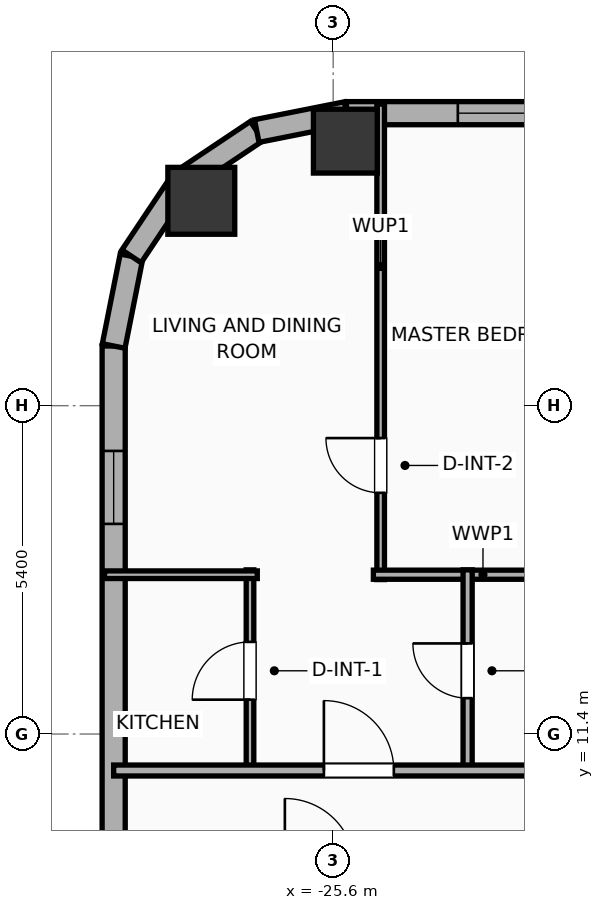
"""IFC4 building model, lengths in metres.
Left out: names, types, materials, properties, quantities, classifications, styles, units other than length and angle.
Written with IfcOpenShell. Run it as: python <this file> out.ifc"""

import sys

from ifc_helpers import new_model, si_unit, direction, frame, frame_2d, origin, origin_2d, place, context, subcontext, project, spatial, rectangle, hollow_rectangle, hollow_circle, extrude, element, fill, save


model = new_model("IFC4")
c1 = context("Model", 3, precision=1e-05, world=origin(), true_north=direction((0.0, 1.0)))
c2 = subcontext(c1, "Body", "Model", "MODEL_VIEW")
j1 = project(units=[si_unit("LENGTHUNIT", "METRE"), si_unit("PLANEANGLEUNIT", "RADIAN")], contexts=[c1])
p1 = place(None, origin())
s1 = spatial("IfcSite", under=j1, at=p1, CompositionType="ELEMENT")
p2 = place(p1, origin())
s2 = spatial("IfcBuilding", under=s1, at=p2, CompositionType="ELEMENT")
p3 = place(p2, frame((0.0, 0.0, 109.2)))
s3 = spatial("IfcBuildingStorey", under=s2, at=p3, CompositionType="ELEMENT", Elevation=109.2)
p4 = place(p3, frame((-25.4, 21.15, 0.0), z_axis=(0.0, 0.0, 1.0), x_axis=(1.0, 0.0, 0.0)))
e1 = element("IfcColumn", 1, at=p4, inside=s3, PredefinedType="COLUMN", context=c2, shape_type="SweptSolid", body=[
    extrude(hollow_rectangle(XDim=1.05, YDim=1.05, WallThickness=0.036, at=origin_2d()), origin(), (0.0, 0.0, 1.0), 3.9),
])
p5 = place(p3, frame((-27.769, 20.169, 0.0), z_axis=(0.0, 0.0, 1.0), x_axis=(1.0, 0.0, 0.0)))
e2 = element("IfcColumn", 2, at=p5, inside=s3, PredefinedType="COLUMN", context=c2, shape_type="SweptSolid", body=[
    extrude(hollow_circle(Radius=0.55, WallThickness=0.036, at=origin_2d()), origin(), (0.0, 0.0, 1.0), 3.9),
])
p6 = place(p3, frame((-29.21, -16.581, 0.0), z_axis=(0.0, 0.0, 1.0), x_axis=(0.0, 1.0, 0.0)))
e3 = element("IfcWall", 3, at=p6, inside=s3, PredefinedType="ELEMENTEDWALL", context=c2, shape_type="SweptSolid", body=[
    extrude(rectangle(XDim=34.363, YDim=0.38, at=frame_2d((17.181, 0.0))), origin(), (0.0, 0.0, 1.0), 3.65),
])
p7 = place(p6, frame((31.437, 0.0, 0.75)))
e4 = element("IfcOpeningElement", 4, at=p7, cuts=e3, PredefinedType="OPENING", context=c2, shape_type="SweptSolid", body=[
    extrude(rectangle(XDim=1.2, YDim=2.05, at=frame_2d((0.6, 1.025))), frame((0.0, 0.2, 0.0), z_axis=(0.0, -1.0, 0.0), x_axis=(1.0, 0.0, 0.0)), (0.0, 0.0, 1.0), 0.4),
])
p8 = place(p6, frame((20.676, 0.0, 0.75)))
e5 = element("IfcOpeningElement", 5, at=p8, cuts=e3, PredefinedType="OPENING", context=c2, shape_type="SweptSolid", body=[
    extrude(rectangle(XDim=1.2, YDim=2.05, at=frame_2d((0.6, 1.025))), frame((0.0, 0.2, 0.0), z_axis=(0.0, -1.0, 0.0), x_axis=(1.0, 0.0, 0.0)), (0.0, 0.0, 1.0), 0.4),
])
p9 = place(p6, frame((11.426, 0.0, 0.75)))
e6 = element("IfcOpeningElement", 6, at=p9, cuts=e3, PredefinedType="OPENING", context=c2, shape_type="SweptSolid", body=[
    extrude(rectangle(XDim=1.2, YDim=2.05, at=frame_2d((0.6, 1.025))), frame((0.0, 0.2, 0.0), z_axis=(0.0, -1.0, 0.0), x_axis=(1.0, 0.0, 0.0)), (0.0, 0.0, 1.0), 0.4),
])
p10 = place(p3, frame((-29.21, 17.781, 0.0), z_axis=(0.0, 0.0, 1.0), x_axis=(0.195086038585, 0.980786132421, 0.0)))
e7 = element("IfcWall", 7, at=p10, inside=s3, PredefinedType="ELEMENTEDWALL", context=c2, shape_type="SweptSolid", body=[
    extrude(rectangle(XDim=1.504, YDim=0.38, at=frame_2d((0.752, 0.0))), origin(), (0.0, 0.0, 1.0), 3.65),
])
p11 = place(p3, frame((-28.917, 19.257, 0.0), z_axis=(0.0, 0.0, 1.0), x_axis=(0.555610286119, 0.831442848281, 0.0)))
e8 = element("IfcWall", 8, at=p11, inside=s3, PredefinedType="ELEMENTEDWALL", context=c2, shape_type="SweptSolid", body=[
    extrude(rectangle(XDim=1.485, YDim=0.38, at=frame_2d((0.743, 0.0))), origin(), (0.0, 0.0, 1.0), 3.65),
])
p12 = place(p3, frame((-28.091, 20.491, 0.0), z_axis=(0.0, 0.0, 1.0), x_axis=(0.831468045563, 0.555572577804, 0.0)))
e9 = element("IfcWall", 9, at=p12, inside=s3, PredefinedType="ELEMENTEDWALL", context=c2, shape_type="SweptSolid", body=[
    extrude(rectangle(XDim=1.485, YDim=0.38, at=frame_2d((0.742, 0.0))), origin(), (0.0, 0.0, 1.0), 3.65),
])
p13 = place(p3, frame((-26.857, 21.316, 0.0), z_axis=(0.0, 0.0, 1.0), x_axis=(0.980755066645, 0.195242155415, 0.0)))
e10 = element("IfcWall", 10, at=p13, inside=s3, PredefinedType="ELEMENTEDWALL", context=c2, shape_type="SweptSolid", body=[
    extrude(rectangle(XDim=1.504, YDim=0.38, at=frame_2d((0.752, 0.0))), origin(), (0.0, 0.0, 1.0), 3.65),
])
p14 = place(p3, frame((-25.381, 21.61, 0.0), z_axis=(0.0, 0.0, 1.0), x_axis=(1.0, 0.0, 0.0)))
e11 = element("IfcWall", 11, at=p14, inside=s3, PredefinedType="ELEMENTEDWALL", context=c2, shape_type="SweptSolid", body=[
    extrude(rectangle(XDim=54.763, YDim=0.38, at=frame_2d((27.381, 0.0))), origin(), (0.0, 0.0, 1.0), 3.65),
])
p15 = place(p14, frame((5.645, 0.0, 0.75)))
e12 = element("IfcOpeningElement", 12, at=p15, cuts=e11, PredefinedType="OPENING", context=c2, shape_type="SweptSolid", body=[
    extrude(rectangle(XDim=2.4, YDim=2.1, at=frame_2d((1.2, 1.05))), frame((0.0, 0.2, 0.0), z_axis=(0.0, -1.0, 0.0), x_axis=(1.0, 0.0, 0.0)), (0.0, 0.0, 1.0), 0.4),
])
p16 = place(p14, frame((45.067, 0.0, 0.75)))
e13 = element("IfcOpeningElement", 13, at=p16, cuts=e11, PredefinedType="OPENING", context=c2, shape_type="SweptSolid", body=[
    extrude(rectangle(XDim=2.4, YDim=2.1, at=frame_2d((1.2, 1.05))), frame((0.0, 0.2, 0.0), z_axis=(0.0, -1.0, 0.0), x_axis=(1.0, 0.0, 0.0)), (0.0, 0.0, 1.0), 0.4),
])
p17 = place(p14, frame((1.831, 0.0, 0.75)))
e14 = element("IfcOpeningElement", 14, at=p17, cuts=e11, PredefinedType="OPENING", context=c2, shape_type="SweptSolid", body=[
    extrude(rectangle(XDim=1.2, YDim=2.05, at=frame_2d((0.6, 1.025))), frame((0.0, 0.2, 0.0), z_axis=(0.0, -1.0, 0.0), x_axis=(1.0, 0.0, 0.0)), (0.0, 0.0, 1.0), 0.4),
])
p18 = place(p14, frame((8.996, 0.0, 0.75)))
e15 = element("IfcOpeningElement", 15, at=p18, cuts=e11, PredefinedType="OPENING", context=c2, shape_type="SweptSolid", body=[
    extrude(rectangle(XDim=1.2, YDim=2.05, at=frame_2d((0.6, 1.025))), frame((0.0, 0.2, 0.0), z_axis=(0.0, -1.0, 0.0), x_axis=(1.0, 0.0, 0.0)), (0.0, 0.0, 1.0), 0.4),
])
p19 = place(p14, frame((15.102, 0.0, 0.75)))
e16 = element("IfcOpeningElement", 16, at=p19, cuts=e11, PredefinedType="OPENING", context=c2, shape_type="SweptSolid", body=[
    extrude(rectangle(XDim=1.2, YDim=2.05, at=frame_2d((0.6, 1.025))), frame((0.0, 0.2, 0.0), z_axis=(0.0, -1.0, 0.0), x_axis=(1.0, 0.0, 0.0)), (0.0, 0.0, 1.0), 0.4),
])
p20 = place(p14, frame((12.352, 0.0, 0.75)))
e17 = element("IfcOpeningElement", 17, at=p20, cuts=e11, PredefinedType="OPENING", context=c2, shape_type="SweptSolid", body=[
    extrude(rectangle(XDim=1.2, YDim=2.05, at=frame_2d((0.6, 1.025))), frame((0.0, 0.2, 0.0), z_axis=(0.0, -1.0, 0.0), x_axis=(1.0, 0.0, 0.0)), (0.0, 0.0, 1.0), 0.4),
])
p21 = place(p14, frame((19.936, 0.0, 0.75)))
e18 = element("IfcOpeningElement", 18, at=p21, cuts=e11, PredefinedType="OPENING", context=c2, shape_type="SweptSolid", body=[
    extrude(rectangle(XDim=1.2, YDim=2.05, at=frame_2d((0.6, 1.025))), frame((0.0, 0.2, 0.0), z_axis=(0.0, -1.0, 0.0), x_axis=(1.0, 0.0, 0.0)), (0.0, 0.0, 1.0), 0.4),
])
p22 = place(p14, frame((17.786, 0.0, 0.75)))
e19 = element("IfcOpeningElement", 19, at=p22, cuts=e11, PredefinedType="OPENING", context=c2, shape_type="SweptSolid", body=[
    extrude(rectangle(XDim=1.2, YDim=2.05, at=frame_2d((0.6, 1.025))), frame((0.0, 0.2, 0.0), z_axis=(0.0, -1.0, 0.0), x_axis=(1.0, 0.0, 0.0)), (0.0, 0.0, 1.0), 0.4),
])
p23 = place(p14, frame((23.826, 0.0, 0.75)))
e20 = element("IfcOpeningElement", 20, at=p23, cuts=e11, PredefinedType="OPENING", context=c2, shape_type="SweptSolid", body=[
    extrude(rectangle(XDim=1.2, YDim=2.05, at=frame_2d((0.6, 1.025))), frame((0.0, 0.2, 0.0), z_axis=(0.0, -1.0, 0.0), x_axis=(1.0, 0.0, 0.0)), (0.0, 0.0, 1.0), 0.4),
])
p24 = place(p14, frame((26.576, 0.0, 0.75)))
e21 = element("IfcOpeningElement", 21, at=p24, cuts=e11, PredefinedType="OPENING", context=c2, shape_type="SweptSolid", body=[
    extrude(rectangle(XDim=1.2, YDim=2.05, at=frame_2d((0.6, 1.025))), frame((0.0, 0.2, 0.0), z_axis=(0.0, -1.0, 0.0), x_axis=(1.0, 0.0, 0.0)), (0.0, 0.0, 1.0), 0.4),
])
p25 = place(p14, frame((30.431, 0.0, 0.75)))
e22 = element("IfcOpeningElement", 22, at=p25, cuts=e11, PredefinedType="OPENING", context=c2, shape_type="SweptSolid", body=[
    extrude(rectangle(XDim=1.2, YDim=2.05, at=frame_2d((0.6, 1.025))), frame((0.0, 0.2, 0.0), z_axis=(0.0, -1.0, 0.0), x_axis=(1.0, 0.0, 0.0)), (0.0, 0.0, 1.0), 0.4),
])
p26 = place(p14, frame((38.581, 0.0, 0.75)))
e23 = element("IfcOpeningElement", 23, at=p26, cuts=e11, PredefinedType="OPENING", context=c2, shape_type="SweptSolid", body=[
    extrude(rectangle(XDim=1.2, YDim=2.05, at=frame_2d((0.6, 1.025))), frame((0.0, 0.2, 0.0), z_axis=(0.0, -1.0, 0.0), x_axis=(1.0, 0.0, 0.0)), (0.0, 0.0, 1.0), 0.4),
])
p27 = place(p14, frame((34.786, 0.0, 0.75)))
e24 = element("IfcOpeningElement", 24, at=p27, cuts=e11, PredefinedType="OPENING", context=c2, shape_type="SweptSolid", body=[
    extrude(rectangle(XDim=1.2, YDim=2.05, at=frame_2d((0.6, 1.025))), frame((0.0, 0.2, 0.0), z_axis=(0.0, -1.0, 0.0), x_axis=(1.0, 0.0, 0.0)), (0.0, 0.0, 1.0), 0.4),
])
p28 = place(p14, frame((41.876, 0.0, 0.75)))
e25 = element("IfcOpeningElement", 25, at=p28, cuts=e11, PredefinedType="OPENING", context=c2, shape_type="SweptSolid", body=[
    extrude(rectangle(XDim=1.2, YDim=2.05, at=frame_2d((0.6, 1.025))), frame((0.0, 0.2, 0.0), z_axis=(0.0, -1.0, 0.0), x_axis=(1.0, 0.0, 0.0)), (0.0, 0.0, 1.0), 0.4),
])
p29 = place(p14, frame((49.385, 0.0, 0.75)))
e26 = element("IfcOpeningElement", 26, at=p29, cuts=e11, PredefinedType="OPENING", context=c2, shape_type="SweptSolid", body=[
    extrude(rectangle(XDim=1.2, YDim=2.05, at=frame_2d((0.6, 1.025))), frame((0.0, 0.2, 0.0), z_axis=(0.0, -1.0, 0.0), x_axis=(1.0, 0.0, 0.0)), (0.0, 0.0, 1.0), 0.4),
])
p30 = place(p14, frame((52.181, 0.0, 0.75)))
e27 = element("IfcOpeningElement", 27, at=p30, cuts=e11, PredefinedType="OPENING", context=c2, shape_type="SweptSolid", body=[
    extrude(rectangle(XDim=1.2, YDim=2.05, at=frame_2d((0.6, 1.025))), frame((0.0, 0.2, 0.0), z_axis=(0.0, -1.0, 0.0), x_axis=(1.0, 0.0, 0.0)), (0.0, 0.0, 1.0), 0.4),
])
p31 = place(p3, frame((-24.819, 13.94, 0.0), z_axis=(0.0, 0.0, 1.0), x_axis=(0.0, 1.0, 0.0)))
e28 = element("IfcWall", 28, at=p31, inside=s3, PredefinedType="PARTITIONING", context=c2, shape_type="SweptSolid", body=[
    extrude(rectangle(XDim=7.82, YDim=0.125, at=frame_2d((3.91, 0.0))), origin(), (0.0, 0.0, 1.0), 3.65),
])
p32 = place(p31, frame((1.427, 0.0, 0.0)))
e29 = element("IfcOpeningElement", 29, at=p32, cuts=e28, PredefinedType="OPENING", context=c2, shape_type="SweptSolid", body=[
    extrude(rectangle(XDim=0.9, YDim=2.05, at=frame_2d((0.45, 1.025))), frame((0.0, 0.073, 0.0), z_axis=(0.0, -1.0, 0.0), x_axis=(1.0, 0.0, 0.0)), (0.0, 0.0, 1.0), 0.145),
])
p33 = place(p3, frame((-24.939, 14.02, 0.0), z_axis=(0.0, 0.0, 1.0), x_axis=(1.0, 0.0, 0.0)))
e30 = element("IfcWall", 30, at=p33, inside=s3, PredefinedType="PLUMBINGWALL", context=c2, shape_type="SweptSolid", body=[
    extrude(rectangle(XDim=3.605, YDim=0.15, at=frame_2d((1.802, 0.0))), origin(), (0.0, 0.0, 1.0), 3.65),
])
p34 = place(p3, frame((-26.968, 10.78, 0.0), z_axis=(0.0, 0.0, 1.0), x_axis=(0.0, 1.0, 0.0)))
e31 = element("IfcWall", 31, at=p34, inside=s3, PredefinedType="PARTITIONING", context=c2, shape_type="SweptSolid", body=[
    extrude(rectangle(XDim=3.32, YDim=0.125, at=frame_2d((1.66, 0.0))), origin(), (0.0, 0.0, 1.0), 3.65),
])
p35 = place(p34, frame((1.185, 0.0, 0.0)))
e32 = element("IfcOpeningElement", 32, at=p35, cuts=e31, PredefinedType="OPENING", context=c2, shape_type="SweptSolid", body=[
    extrude(rectangle(XDim=0.95, YDim=2.05, at=frame_2d((0.475, 1.025))), frame((0.0, 0.073, 0.0), z_axis=(0.0, -1.0, 0.0), x_axis=(1.0, 0.0, 0.0)), (0.0, 0.0, 1.0), 0.145),
])
p36 = place(p3, frame((-29.36, 14.02, 0.0), z_axis=(0.0, 0.0, 1.0), x_axis=(1.0, 0.0, 0.0)))
e33 = element("IfcWall", 33, at=p36, inside=s3, PredefinedType="PARTITIONING", context=c2, shape_type="SweptSolid", body=[
    extrude(rectangle(XDim=2.512, YDim=0.125, at=frame_2d((1.256, 0.0))), origin(), (0.0, 0.0, 1.0), 3.65),
])
p37 = place(p3, frame((-23.389, 10.78, 0.0), z_axis=(0.0, 0.0, 1.0), x_axis=(0.0, 1.0, 0.0)))
e34 = element("IfcWall", 34, at=p37, inside=s3, PredefinedType="PLUMBINGWALL", context=c2, shape_type="SweptSolid", body=[
    extrude(rectangle(XDim=3.32, YDim=0.15, at=frame_2d((1.66, 0.0))), origin(), (0.0, 0.0, 1.0), 3.65),
])
p38 = place(p37, frame((1.21, 0.0, 0.0)))
e35 = element("IfcOpeningElement", 35, at=p38, cuts=e34, PredefinedType="OPENING", context=c2, shape_type="SweptSolid", body=[
    extrude(rectangle(XDim=0.9, YDim=2.05, at=frame_2d((0.45, 1.025))), frame((0.0, 0.085, 0.0), z_axis=(0.0, -1.0, 0.0), x_axis=(1.0, 0.0, 0.0)), (0.0, 0.0, 1.0), 0.17),
])
p39 = place(p3, frame((-29.21, 10.8, 0.0), z_axis=(0.0, 0.0, 1.0), x_axis=(1.0, 0.0, 0.0)))
e36 = element("IfcWall", 36, at=p39, inside=s3, PredefinedType="PARTITIONING", context=c2, shape_type="SweptSolid", body=[
    extrude(rectangle(XDim=62.42, YDim=0.18, at=frame_2d((31.21, 0.0))), origin(), (0.0, 0.0, 1.0), 3.65),
])
p40 = place(p39, frame((3.457, 0.0, 0.0)))
e37 = element("IfcOpeningElement", 37, at=p40, cuts=e36, PredefinedType="OPENING", context=c2, shape_type="SweptSolid", body=[
    extrude(rectangle(XDim=1.15, YDim=2.05, at=frame_2d((0.575, 1.025))), frame((0.0, 0.1, 0.0), z_axis=(0.0, -1.0, 0.0), x_axis=(1.0, 0.0, 0.0)), (0.0, 0.0, 1.0), 0.2),
])
p41 = place(p39, frame((11.297, 0.0, 0.0)))
e38 = element("IfcOpeningElement", 38, at=p41, cuts=e36, PredefinedType="OPENING", context=c2, shape_type="SweptSolid", body=[
    extrude(rectangle(XDim=1.15, YDim=2.05, at=frame_2d((0.575, 1.025))), frame((0.0, 0.1, 0.0), z_axis=(0.0, -1.0, 0.0), x_axis=(1.0, 0.0, 0.0)), (0.0, 0.0, 1.0), 0.2),
])
p42 = place(p39, frame((18.925, 0.0, 0.0)))
e39 = element("IfcOpeningElement", 39, at=p42, cuts=e36, PredefinedType="OPENING", context=c2, shape_type="SweptSolid", body=[
    extrude(rectangle(XDim=1.15, YDim=2.05, at=frame_2d((0.575, 1.025))), frame((0.0, 0.1, 0.0), z_axis=(0.0, -1.0, 0.0), x_axis=(1.0, 0.0, 0.0)), (0.0, 0.0, 1.0), 0.2),
])
p43 = place(p39, frame((24.362, 0.0, 0.0)))
e40 = element("IfcOpeningElement", 40, at=p43, cuts=e36, PredefinedType="OPENING", context=c2, shape_type="SweptSolid", body=[
    extrude(rectangle(XDim=1.15, YDim=2.05, at=frame_2d((0.575, 1.025))), frame((0.0, 0.1, 0.0), z_axis=(0.0, -1.0, 0.0), x_axis=(1.0, 0.0, 0.0)), (0.0, 0.0, 1.0), 0.2),
])
p44 = place(p39, frame((27.708, 0.0, 0.0)))
e41 = element("IfcOpeningElement", 41, at=p44, cuts=e36, PredefinedType="OPENING", context=c2, shape_type="SweptSolid", body=[
    extrude(rectangle(XDim=1.15, YDim=2.05, at=frame_2d((0.575, 1.025))), frame((0.0, 0.1, 0.0), z_axis=(0.0, -1.0, 0.0), x_axis=(1.0, 0.0, 0.0)), (0.0, 0.0, 1.0), 0.2),
])
p45 = place(p39, frame((34.618, 0.0, 0.0)))
e42 = element("IfcOpeningElement", 42, at=p45, cuts=e36, PredefinedType="OPENING", context=c2, shape_type="SweptSolid", body=[
    extrude(rectangle(XDim=0.9, YDim=2.05, at=frame_2d((0.45, 1.025))), frame((0.0, 0.1, 0.0), z_axis=(0.0, -1.0, 0.0), x_axis=(1.0, 0.0, 0.0)), (0.0, 0.0, 1.0), 0.2),
])
p46 = place(p39, frame((43.106, 0.0, 0.0)))
e43 = element("IfcOpeningElement", 43, at=p46, cuts=e36, PredefinedType="OPENING", context=c2, shape_type="SweptSolid", body=[
    extrude(rectangle(XDim=1.15, YDim=2.05, at=frame_2d((0.575, 1.025))), frame((0.0, 0.1, 0.0), z_axis=(0.0, -1.0, 0.0), x_axis=(1.0, 0.0, 0.0)), (0.0, 0.0, 1.0), 0.2),
])
p47 = place(p39, frame((51.777, 0.0, 0.0)))
e44 = element("IfcOpeningElement", 44, at=p47, cuts=e36, PredefinedType="OPENING", context=c2, shape_type="SweptSolid", body=[
    extrude(rectangle(XDim=0.9, YDim=2.05, at=frame_2d((0.45, 1.025))), frame((0.0, 0.1, 0.0), z_axis=(0.0, -1.0, 0.0), x_axis=(1.0, 0.0, 0.0)), (0.0, 0.0, 1.0), 0.2),
])
p48 = place(p39, frame((58.718, 0.0, 0.0)))
e45 = element("IfcOpeningElement", 45, at=p48, cuts=e36, PredefinedType="OPENING", context=c2, shape_type="SweptSolid", body=[
    extrude(rectangle(XDim=0.9, YDim=2.05, at=frame_2d((0.45, 1.025))), frame((0.0, 0.1, 0.0), z_axis=(0.0, -1.0, 0.0), x_axis=(1.0, 0.0, 0.0)), (0.0, 0.0, 1.0), 0.2),
])
p49 = place(p7, origin())
e46 = element("IfcWindow", 46, at=p49, inside=s3, PartitioningType="SINGLE_PANEL", PredefinedType="WINDOW", context=c2, shape_type="SweptSolid", body=[
    extrude(rectangle(XDim=1.2, YDim=2.05, at=frame_2d((0.6, 1.025))), frame((0.0, 0.03, 0.0), z_axis=(0.0, -1.0, 0.0), x_axis=(1.0, 0.0, 0.0)), (0.0, 0.0, 1.0), 0.06),
])
fill(e4, e46)
p50 = place(p17, origin())
e47 = element("IfcWindow", 47, at=p50, inside=s3, PartitioningType="SINGLE_PANEL", PredefinedType="WINDOW", context=c2, shape_type="SweptSolid", body=[
    extrude(rectangle(XDim=1.2, YDim=2.05, at=frame_2d((0.6, 1.025))), frame((0.0, 0.03, 0.0), z_axis=(0.0, -1.0, 0.0), x_axis=(1.0, 0.0, 0.0)), (0.0, 0.0, 1.0), 0.06),
])
fill(e14, e47)
p51 = place(p32, origin())
e48 = element("IfcDoor", 48, at=p51, inside=s3, OperationType="SINGLE_SWING_RIGHT", PredefinedType="DOOR", context=c2, shape_type="SweptSolid", body=[
    extrude(rectangle(XDim=0.9, YDim=2.05, at=frame_2d((0.45, 1.025))), frame((0.0, 0.025, 0.0), z_axis=(0.0, -1.0, 0.0), x_axis=(1.0, 0.0, 0.0)), (0.0, 0.0, 1.0), 0.05),
])
fill(e29, e48)
p52 = place(p35, origin())
e49 = element("IfcDoor", 49, at=p52, inside=s3, OperationType="SINGLE_SWING_LEFT", PredefinedType="DOOR", context=c2, shape_type="SweptSolid", body=[
    extrude(rectangle(XDim=0.95, YDim=2.05, at=frame_2d((0.475, 1.025))), frame((0.0, 0.025, 0.0), z_axis=(0.0, -1.0, 0.0), x_axis=(1.0, 0.0, 0.0)), (0.0, 0.0, 1.0), 0.05),
])
fill(e32, e49)
p53 = place(p38, origin())
e50 = element("IfcDoor", 50, at=p53, inside=s3, OperationType="SINGLE_SWING_RIGHT", PredefinedType="DOOR", context=c2, shape_type="SweptSolid", body=[
    extrude(rectangle(XDim=0.9, YDim=2.05, at=frame_2d((0.45, 1.025))), frame((0.0, 0.025, 0.0), z_axis=(0.0, -1.0, 0.0), x_axis=(1.0, 0.0, 0.0)), (0.0, 0.0, 1.0), 0.05),
])
fill(e35, e50)
p54 = place(p40, origin())
e51 = element("IfcDoor", 51, at=p54, inside=s3, OperationType="SINGLE_SWING_LEFT", PredefinedType="DOOR", context=c2, shape_type="SweptSolid", body=[
    extrude(rectangle(XDim=1.15, YDim=2.05, at=frame_2d((0.575, 1.025))), frame((0.0, 0.025, 0.0), z_axis=(0.0, -1.0, 0.0), x_axis=(1.0, 0.0, 0.0)), (0.0, 0.0, 1.0), 0.05),
])
fill(e37, e51)
save(model, sys.argv[1])
